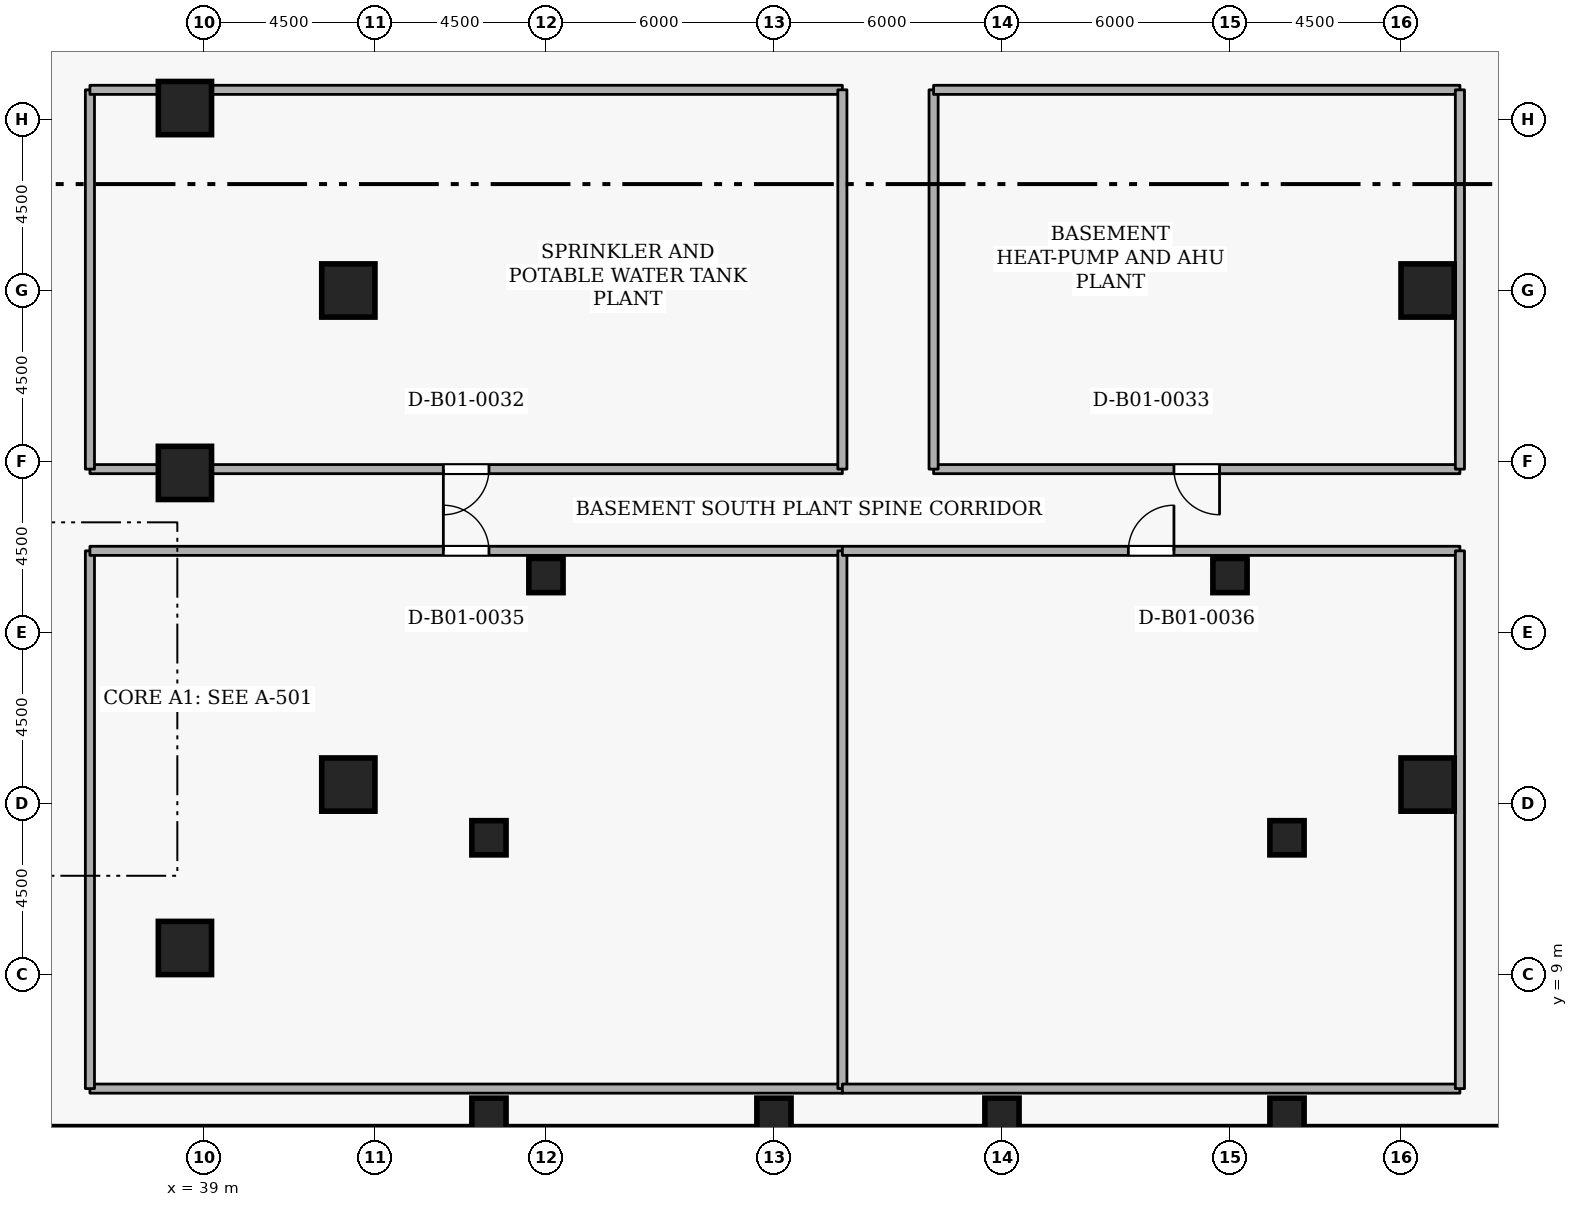
"""IFC4 building model, lengths in metres.
Left out: names, types, materials, properties, quantities, classifications, styles, units other than length and angle.
Written with IfcOpenShell. Run it as: python <this file> out.ifc"""

import sys

from ifc_helpers import new_model, si_unit, direction, frame, frame_2d, origin, origin_2d, place, context, subcontext, project, spatial, rectangle, extrude, element, fill, save


model = new_model("IFC4")
c1 = context("Model", 3, precision=1e-05, world=origin(), true_north=direction((0.0, 1.0)))
c2 = subcontext(c1, "Body", "Model", "MODEL_VIEW")
j1 = project(units=[si_unit("LENGTHUNIT", "METRE"), si_unit("PLANEANGLEUNIT", "RADIAN")], contexts=[c1])
p1 = place(None, origin())
s1 = spatial("IfcSite", under=j1, at=p1, CompositionType="ELEMENT")
p2 = place(p1, origin())
s2 = spatial("IfcBuilding", under=s1, at=p2, CompositionType="ELEMENT")
p3 = place(p2, frame((0.0, 0.0, -5.4)))
s3 = spatial("IfcBuildingStorey", under=s2, at=p3, CompositionType="ELEMENT", Elevation=-5.4)
for number, where, z_axis, x_axis in (
    (1, (38.5, 9.7, -0.6), (0.0, 0.0, 1.0), (1.0, 0.0, 0.0)),
    (2, (42.8, 14.0, -0.6), (0.0, 0.0, 1.0), (1.0, 0.0, 0.0)),
    (3, (42.8, 27.0, -0.6), (0.0, 0.0, 1.0), (1.0, 0.0, 0.0)),
    (4, (38.5, 22.2, -0.6), (0.0, 0.0, 1.0), (1.0, 0.0, 0.0)),
    (5, (38.5, 31.8, -0.6), (0.0, 0.0, 1.0), (1.0, 0.0, 0.0)),
    (6, (71.2, 14.0, -0.6), (0.0, 0.0, 1.0), (1.0, 0.0, 0.0)),
    (7, (71.2, 27.0, -0.6), (0.0, 0.0, 1.0), (1.0, 0.0, 0.0)),
):
    element("IfcColumn", number, at=place(p3, frame(where, z_axis=z_axis, x_axis=x_axis)), inside=s3, PredefinedType="COLUMN", context=c2, shape_type="SweptSolid", body=[
        extrude(rectangle(XDim=1.4, YDim=1.4, at=origin_2d()), origin(), (0.0, 0.0, 1.0), 6.0),
    ])
for number, where, z_axis, x_axis in (
    (8, (46.5, 5.3, -0.6), (0.0, 0.0, 1.0), (1.0, 0.0, 0.0)),
    (9, (54.0, 5.3, -0.6), (0.0, 0.0, 1.0), (1.0, 0.0, 0.0)),
    (10, (60.0, 5.3, -0.6), (0.0, 0.0, 1.0), (1.0, 0.0, 0.0)),
    (11, (67.5, 5.3, -0.6), (0.0, 0.0, 1.0), (1.0, 0.0, 0.0)),
    (12, (46.5, 12.6, -0.6), (0.0, 0.0, 1.0), (1.0, 0.0, 0.0)),
    (13, (67.5, 12.6, -0.6), (0.0, 0.0, 1.0), (1.0, 0.0, 0.0)),
    (14, (48.0, 19.5, -0.6), (0.0, 0.0, 1.0), (1.0, 0.0, 0.0)),
    (15, (66.0, 19.5, -0.6), (0.0, 0.0, 1.0), (1.0, 0.0, 0.0)),
):
    element("IfcColumn", number, at=place(p3, frame(where, z_axis=z_axis, x_axis=x_axis)), inside=s3, PredefinedType="COLUMN", context=c2, shape_type="SweptSolid", body=[
        extrude(rectangle(XDim=0.9, YDim=0.9, at=origin_2d()), origin(), (0.0, 0.0, 1.0), 6.0),
    ])
p4 = place(p3, frame((55.8, 6.0, 0.0), z_axis=(0.0, 0.0, 1.0), x_axis=(-1.0, 0.0, 0.0)))
e16 = element("IfcWall", 16, at=p4, inside=s3, PredefinedType="STANDARD", context=c2, shape_type="SweptSolid", body=[
    extrude(rectangle(XDim=19.8, YDim=0.24, at=frame_2d((9.9, 0.0))), origin(), (0.0, 0.0, 1.0), 5.06),
])
p5 = place(p3, frame((36.0, 6.0, 0.0), z_axis=(0.0, 0.0, 1.0), x_axis=(0.0, 1.0, 0.0)))
e17 = element("IfcWall", 17, at=p5, inside=s3, PredefinedType="STANDARD", context=c2, shape_type="SweptSolid", body=[
    extrude(rectangle(XDim=14.15, YDim=0.24, at=frame_2d((7.075, 0.0))), origin(), (0.0, 0.0, 1.0), 5.06),
])
p6 = place(p3, frame((36.0, 20.15, 0.0), z_axis=(0.0, 0.0, 1.0), x_axis=(1.0, 0.0, 0.0)))
e18 = element("IfcWall", 18, at=p6, inside=s3, PredefinedType="STANDARD", context=c2, shape_type="SweptSolid", body=[
    extrude(rectangle(XDim=19.8, YDim=0.24, at=frame_2d((9.9, 0.0))), origin(), (0.0, 0.0, 1.0), 5.06),
])
p7 = place(p6, frame((9.3, 0.0, 0.0)))
e19 = element("IfcOpeningElement", 19, at=p7, cuts=e18, PredefinedType="OPENING", context=c2, shape_type="SweptSolid", body=[
    extrude(rectangle(XDim=1.2, YDim=2.1, at=frame_2d((0.6, 1.05))), frame((0.0, 0.13, 0.0), z_axis=(0.0, -1.0, 0.0), x_axis=(1.0, 0.0, 0.0)), (0.0, 0.0, 1.0), 0.26),
])
p8 = place(p3, frame((55.8, 20.15, 0.0), z_axis=(0.0, 0.0, 1.0), x_axis=(0.0, -1.0, 0.0)))
e20 = element("IfcWall", 20, at=p8, inside=s3, PredefinedType="STANDARD", context=c2, shape_type="SweptSolid", body=[
    extrude(rectangle(XDim=14.15, YDim=0.24, at=frame_2d((7.075, 0.0))), origin(), (0.0, 0.0, 1.0), 5.06),
])
p9 = place(p3, frame((72.05, 6.0, 0.0), z_axis=(0.0, 0.0, 1.0), x_axis=(-1.0, 0.0, 0.0)))
e21 = element("IfcWall", 21, at=p9, inside=s3, PredefinedType="STANDARD", context=c2, shape_type="SweptSolid", body=[
    extrude(rectangle(XDim=16.25, YDim=0.24, at=frame_2d((8.125, 0.0))), origin(), (0.0, 0.0, 1.0), 5.06),
])
p10 = place(p3, frame((55.8, 20.15, 0.0), z_axis=(0.0, 0.0, 1.0), x_axis=(1.0, 0.0, 0.0)))
e22 = element("IfcWall", 22, at=p10, inside=s3, PredefinedType="STANDARD", context=c2, shape_type="SweptSolid", body=[
    extrude(rectangle(XDim=16.25, YDim=0.24, at=frame_2d((8.125, 0.0))), origin(), (0.0, 0.0, 1.0), 5.06),
])
p11 = place(p10, frame((7.525, 0.0, 0.0)))
e23 = element("IfcOpeningElement", 23, at=p11, cuts=e22, PredefinedType="OPENING", context=c2, shape_type="SweptSolid", body=[
    extrude(rectangle(XDim=1.2, YDim=2.1, at=frame_2d((0.6, 1.05))), frame((0.0, 0.13, 0.0), z_axis=(0.0, -1.0, 0.0), x_axis=(1.0, 0.0, 0.0)), (0.0, 0.0, 1.0), 0.26),
])
p12 = place(p3, frame((72.05, 20.15, 0.0), z_axis=(0.0, 0.0, 1.0), x_axis=(0.0, -1.0, 0.0)))
e24 = element("IfcWall", 24, at=p12, inside=s3, PredefinedType="STANDARD", context=c2, shape_type="SweptSolid", body=[
    extrude(rectangle(XDim=14.15, YDim=0.24, at=frame_2d((7.075, 0.0))), origin(), (0.0, 0.0, 1.0), 5.06),
])
p13 = place(p3, frame((55.8, 22.3, 0.0), z_axis=(0.0, 0.0, 1.0), x_axis=(-1.0, 0.0, 0.0)))
e25 = element("IfcWall", 25, at=p13, inside=s3, PredefinedType="STANDARD", context=c2, shape_type="SweptSolid", body=[
    extrude(rectangle(XDim=19.8, YDim=0.24, at=frame_2d((9.9, 0.0))), origin(), (0.0, 0.0, 1.0), 5.06),
])
p14 = place(p13, frame((9.3, 0.0, 0.0)))
e26 = element("IfcOpeningElement", 26, at=p14, cuts=e25, PredefinedType="OPENING", context=c2, shape_type="SweptSolid", body=[
    extrude(rectangle(XDim=1.2, YDim=2.1, at=frame_2d((0.6, 1.05))), frame((0.0, 0.13, 0.0), z_axis=(0.0, -1.0, 0.0), x_axis=(1.0, 0.0, 0.0)), (0.0, 0.0, 1.0), 0.26),
])
p15 = place(p3, frame((36.0, 22.3, 0.0), z_axis=(0.0, 0.0, 1.0), x_axis=(0.0, 1.0, 0.0)))
e27 = element("IfcWall", 27, at=p15, inside=s3, PredefinedType="STANDARD", context=c2, shape_type="SweptSolid", body=[
    extrude(rectangle(XDim=9.98, YDim=0.24, at=frame_2d((4.99, 0.0))), origin(), (0.0, 0.0, 1.0), 5.06),
])
p16 = place(p3, frame((36.0, 32.28, 0.0), z_axis=(0.0, 0.0, 1.0), x_axis=(1.0, 0.0, 0.0)))
e28 = element("IfcWall", 28, at=p16, inside=s3, PredefinedType="STANDARD", context=c2, shape_type="SweptSolid", body=[
    extrude(rectangle(XDim=19.8, YDim=0.24, at=frame_2d((9.9, 0.0))), origin(), (0.0, 0.0, 1.0), 5.06),
])
p17 = place(p3, frame((55.8, 32.28, 0.0), z_axis=(0.0, 0.0, 1.0), x_axis=(0.0, -1.0, 0.0)))
e29 = element("IfcWall", 29, at=p17, inside=s3, PredefinedType="STANDARD", context=c2, shape_type="SweptSolid", body=[
    extrude(rectangle(XDim=9.98, YDim=0.24, at=frame_2d((4.99, 0.0))), origin(), (0.0, 0.0, 1.0), 5.06),
])
p18 = place(p3, frame((72.05, 22.3, 0.0), z_axis=(0.0, 0.0, 1.0), x_axis=(-1.0, 0.0, 0.0)))
e30 = element("IfcWall", 30, at=p18, inside=s3, PredefinedType="STANDARD", context=c2, shape_type="SweptSolid", body=[
    extrude(rectangle(XDim=13.85, YDim=0.24, at=frame_2d((6.925, 0.0))), origin(), (0.0, 0.0, 1.0), 5.06),
])
p19 = place(p18, frame((6.325, 0.0, 0.0)))
e31 = element("IfcOpeningElement", 31, at=p19, cuts=e30, PredefinedType="OPENING", context=c2, shape_type="SweptSolid", body=[
    extrude(rectangle(XDim=1.2, YDim=2.1, at=frame_2d((0.6, 1.05))), frame((0.0, 0.13, 0.0), z_axis=(0.0, -1.0, 0.0), x_axis=(1.0, 0.0, 0.0)), (0.0, 0.0, 1.0), 0.26),
])
p20 = place(p3, frame((58.2, 22.3, 0.0), z_axis=(0.0, 0.0, 1.0), x_axis=(0.0, 1.0, 0.0)))
e32 = element("IfcWall", 32, at=p20, inside=s3, PredefinedType="STANDARD", context=c2, shape_type="SweptSolid", body=[
    extrude(rectangle(XDim=9.98, YDim=0.24, at=frame_2d((4.99, 0.0))), origin(), (0.0, 0.0, 1.0), 5.06),
])
p21 = place(p3, frame((58.2, 32.28, 0.0), z_axis=(0.0, 0.0, 1.0), x_axis=(1.0, 0.0, 0.0)))
e33 = element("IfcWall", 33, at=p21, inside=s3, PredefinedType="STANDARD", context=c2, shape_type="SweptSolid", body=[
    extrude(rectangle(XDim=13.85, YDim=0.24, at=frame_2d((6.925, 0.0))), origin(), (0.0, 0.0, 1.0), 5.06),
])
p22 = place(p3, frame((72.05, 32.28, 0.0), z_axis=(0.0, 0.0, 1.0), x_axis=(0.0, -1.0, 0.0)))
e34 = element("IfcWall", 34, at=p22, inside=s3, PredefinedType="STANDARD", context=c2, shape_type="SweptSolid", body=[
    extrude(rectangle(XDim=9.98, YDim=0.24, at=frame_2d((4.99, 0.0))), origin(), (0.0, 0.0, 1.0), 5.06),
])
p23 = place(p7, origin())
e35 = element("IfcDoor", 35, at=p23, inside=s3, OperationType="SINGLE_SWING_LEFT", PredefinedType="DOOR", context=c2, shape_type="SweptSolid", body=[
    extrude(rectangle(XDim=1.2, YDim=2.1, at=frame_2d((0.6, 1.05))), frame((0.0, 0.025, 0.0), z_axis=(0.0, -1.0, 0.0), x_axis=(1.0, 0.0, 0.0)), (0.0, 0.0, 1.0), 0.05),
])
fill(e19, e35)
p24 = place(p11, origin())
e36 = element("IfcDoor", 36, at=p24, inside=s3, OperationType="SINGLE_SWING_RIGHT", PredefinedType="DOOR", context=c2, shape_type="SweptSolid", body=[
    extrude(rectangle(XDim=1.2, YDim=2.1, at=frame_2d((0.6, 1.05))), frame((0.0, 0.025, 0.0), z_axis=(0.0, -1.0, 0.0), x_axis=(1.0, 0.0, 0.0)), (0.0, 0.0, 1.0), 0.05),
])
fill(e23, e36)
p25 = place(p14, origin())
e37 = element("IfcDoor", 37, at=p25, inside=s3, OperationType="SINGLE_SWING_RIGHT", PredefinedType="DOOR", context=c2, shape_type="SweptSolid", body=[
    extrude(rectangle(XDim=1.2, YDim=2.1, at=frame_2d((0.6, 1.05))), frame((0.0, 0.025, 0.0), z_axis=(0.0, -1.0, 0.0), x_axis=(1.0, 0.0, 0.0)), (0.0, 0.0, 1.0), 0.05),
])
fill(e26, e37)
p26 = place(p19, origin())
e38 = element("IfcDoor", 38, at=p26, inside=s3, OperationType="SINGLE_SWING_LEFT", PredefinedType="DOOR", context=c2, shape_type="SweptSolid", body=[
    extrude(rectangle(XDim=1.2, YDim=2.1, at=frame_2d((0.6, 1.05))), frame((0.0, 0.025, 0.0), z_axis=(0.0, -1.0, 0.0), x_axis=(1.0, 0.0, 0.0)), (0.0, 0.0, 1.0), 0.05),
])
fill(e31, e38)
save(model, sys.argv[1])
